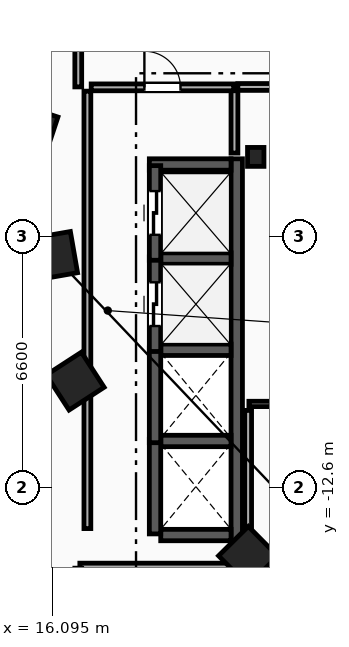
"""IFC4 building model, lengths in metres.
Left out: names, types, materials, properties, quantities, classifications, styles, units other than length and angle.
Written with IfcOpenShell. Run it as: python <this file> out.ifc"""

import sys

from ifc_helpers import new_model, si_unit, direction, frame, frame_2d, origin, origin_2d, place, context, subcontext, project, spatial, rectangle, i_section, extrude, element, fill, save


model = new_model("IFC4")
c1 = context("Model", 3, precision=1e-05, world=origin(), true_north=direction((0.0, 1.0)))
c2 = subcontext(c1, "Body", "Model", "MODEL_VIEW")
j1 = project(units=[si_unit("LENGTHUNIT", "METRE"), si_unit("PLANEANGLEUNIT", "RADIAN")], contexts=[c1])
p1 = place(None, origin())
s1 = spatial("IfcSite", under=j1, at=p1, CompositionType="ELEMENT")
p2 = place(p1, origin())
s2 = spatial("IfcBuilding", under=s1, at=p2, CompositionType="ELEMENT")
p3 = place(p2, frame((0.0, 0.0, 99.8)))
s3 = spatial("IfcBuildingStorey", under=s2, at=p3, CompositionType="ELEMENT", Elevation=99.8)
p4 = place(p3, frame((21.45, -3.9, 0.0), z_axis=(0.0, 0.0, 1.0), x_axis=(1.0, 0.0, 0.0)))
e1 = element("IfcColumn", 1, at=p4, inside=s3, PredefinedType="COLUMN", context=c2, shape_type="SweptSolid", body=[
    extrude(i_section(OverallWidth=0.432, OverallDepth=0.498, WebThickness=0.056, FlangeThickness=0.089, FilletRadius=0.018, at=origin_2d()), origin(), (0.0, 0.0, 1.0), 3.6),
])
for number, where, z_axis, x_axis in (
    (2, (15.55, -3.2, 0.0), (0.0, 0.0, 1.0), (-0.315, -0.949, 0.0)),
    (3, (16.125, -6.5, 0.0), (0.0, 0.0, 1.0), (0.172, -0.985, 0.0)),
    (4, (16.7, -9.8, 0.0), (0.0, 0.0, 1.0), (0.544, -0.839, 0.0)),
    (5, (21.25, -14.4, 0.0), (0.0, 0.0, 1.0), (0.703, -0.711, 0.0)),
):
    element("IfcColumn", number, at=place(p3, frame(where, z_axis=z_axis, x_axis=x_axis)), inside=s3, PredefinedType="COLUMN", context=c2, shape_type="SweptSolid", body=[
        extrude(rectangle(XDim=1.1, YDim=1.1, at=origin_2d()), origin(), (0.0, 0.0, 1.0), 3.6),
    ])
p5 = place(p3, frame((20.89, -3.8, 0.0), z_axis=(0.0, 0.0, 1.0), x_axis=(0.0, 1.0, 0.0)))
e6 = element("IfcWall", 6, at=p5, inside=s3, PredefinedType="PARTITIONING", context=c2, shape_type="SweptSolid", body=[
    extrude(rectangle(XDim=1.65, YDim=0.18, at=frame_2d((0.825, 0.0))), origin(), (0.0, 0.0, 1.0), 3.3),
])
p6 = place(p3, frame((20.98, -2.06, 0.0), z_axis=(0.0, 0.0, 1.0), x_axis=(1.0, 0.0, 0.0)))
e7 = element("IfcWall", 7, at=p6, inside=s3, PredefinedType="PARTITIONING", context=c2, shape_type="SweptSolid", body=[
    extrude(rectangle(XDim=3.0, YDim=0.18, at=frame_2d((1.5, 0.0))), origin(), (0.0, 0.0, 1.0), 3.3),
])
p7 = place(p6, frame((0.9, 0.0, 0.0)))
e8 = element("IfcOpeningElement", 8, at=p7, cuts=e7, PredefinedType="OPENING", context=c2, shape_type="SweptSolid", body=[
    extrude(rectangle(XDim=1.2, YDim=2.15, at=frame_2d((0.6, 1.075))), frame((0.0, 0.1, 0.0), z_axis=(0.0, -1.0, 0.0), x_axis=(1.0, 0.0, 0.0)), (0.0, 0.0, 1.0), 0.2),
])
p8 = place(p3, frame((20.95, -14.0, 0.0), z_axis=(0.0, 0.0, 1.0), x_axis=(0.0, 1.0, 0.0)))
e9 = element("IfcWall", 9, at=p8, inside=s3, PredefinedType="SHEAR", context=c2, shape_type="SweptSolid", body=[
    extrude(rectangle(XDim=10.05, YDim=0.3, at=frame_2d((5.025, 0.0))), origin(), (0.0, 0.0, 1.0), 3.3),
])
p9 = place(p3, frame((18.95, -13.85, 0.0), z_axis=(0.0, 0.0, 1.0), x_axis=(1.0, 0.0, 0.0)))
e10 = element("IfcWall", 10, at=p9, inside=s3, PredefinedType="SHEAR", context=c2, shape_type="SweptSolid", body=[
    extrude(rectangle(XDim=1.85, YDim=0.3, at=frame_2d((0.925, 0.0))), origin(), (0.0, 0.0, 1.0), 3.3),
])
p10 = place(p3, frame((18.65, -4.1, 0.0), z_axis=(0.0, 0.0, 1.0), x_axis=(1.0, 0.0, 0.0)))
e11 = element("IfcWall", 11, at=p10, inside=s3, PredefinedType="SHEAR", context=c2, shape_type="SweptSolid", body=[
    extrude(rectangle(XDim=2.15, YDim=0.3, at=frame_2d((1.075, 0.0))), origin(), (0.0, 0.0, 1.0), 3.3),
])
for number, where, z_axis, x_axis in (
    (12, (18.95, -11.375, 0.0), (0.0, 0.0, 1.0), (1.0, 0.0, 0.0)),
    (13, (18.95, -8.975, 0.0), (0.0, 0.0, 1.0), (1.0, 0.0, 0.0)),
    (14, (18.95, -6.575, 0.0), (0.0, 0.0, 1.0), (1.0, 0.0, 0.0)),
):
    element("IfcWall", number, at=place(p3, frame(where, z_axis=z_axis, x_axis=x_axis)), inside=s3, PredefinedType="SHEAR", context=c2, shape_type="SweptSolid", body=[
        extrude(rectangle(XDim=1.85, YDim=0.3, at=frame_2d((0.925, 0.0))), origin(), (0.0, 0.0, 1.0), 3.3),
    ])
for number, where, z_axis, x_axis in (
    (15, (18.8, -13.82, 0.0), (0.0, 0.0, 1.0), (0.0, 1.0, 0.0)),
    (16, (18.8, -11.42, 0.0), (0.0, 0.0, 1.0), (0.0, 1.0, 0.0)),
):
    element("IfcWall", number, at=place(p3, frame(where, z_axis=z_axis, x_axis=x_axis)), inside=s3, PredefinedType="SHEAR", context=c2, shape_type="SweptSolid", body=[
        extrude(rectangle(XDim=2.49, YDim=0.3, at=frame_2d((1.245, 0.0))), origin(), (0.0, 0.0, 1.0), 3.3),
    ])
p11 = place(p3, frame((18.8, -9.02, 0.0), z_axis=(0.0, 0.0, 1.0), x_axis=(0.0, 1.0, 0.0)))
e17 = element("IfcWall", 17, at=p11, inside=s3, PredefinedType="SHEAR", context=c2, shape_type="SweptSolid", body=[
    extrude(rectangle(XDim=2.49, YDim=0.3, at=frame_2d((1.245, 0.0))), origin(), (0.0, 0.0, 1.0), 3.3),
])
p12 = place(p11, frame((0.67, 0.0, 0.0)))
e18 = element("IfcOpeningElement", 18, at=p12, cuts=e17, PredefinedType="OPENING", context=c2, shape_type="SweptSolid", body=[
    extrude(rectangle(XDim=1.15, YDim=2.2, at=frame_2d((0.575, 1.1))), frame((0.0, 0.16, 0.0), z_axis=(0.0, -1.0, 0.0), x_axis=(1.0, 0.0, 0.0)), (0.0, 0.0, 1.0), 0.32),
])
p13 = place(p3, frame((18.8, -6.62, 0.0), z_axis=(0.0, 0.0, 1.0), x_axis=(0.0, 1.0, 0.0)))
e19 = element("IfcWall", 19, at=p13, inside=s3, PredefinedType="SHEAR", context=c2, shape_type="SweptSolid", body=[
    extrude(rectangle(XDim=2.49, YDim=0.3, at=frame_2d((1.245, 0.0))), origin(), (0.0, 0.0, 1.0), 3.3),
])
p14 = place(p13, frame((0.67, 0.0, 0.0)))
e20 = element("IfcOpeningElement", 20, at=p14, cuts=e19, PredefinedType="OPENING", context=c2, shape_type="SweptSolid", body=[
    extrude(rectangle(XDim=1.15, YDim=2.2, at=frame_2d((0.575, 1.1))), frame((0.0, 0.16, 0.0), z_axis=(0.0, -1.0, 0.0), x_axis=(1.0, 0.0, 0.0)), (0.0, 0.0, 1.0), 0.32),
])
p15 = place(p3, frame((17.02, -13.68, 0.0), z_axis=(0.0, 0.0, 1.0), x_axis=(0.0, 1.0, 0.0)))
e21 = element("IfcWall", 21, at=p15, inside=s3, PredefinedType="PARTITIONING", context=c2, shape_type="SweptSolid", body=[
    extrude(rectangle(XDim=11.51, YDim=0.18, at=frame_2d((5.755, 0.0))), origin(), (0.0, 0.0, 1.0), 3.3),
])
p16 = place(p3, frame((17.12, -2.07, 0.0), z_axis=(0.0, 0.0, 1.0), x_axis=(1.0, 0.0, 0.0)))
e22 = element("IfcWall", 22, at=p16, inside=s3, PredefinedType="PARTITIONING", context=c2, shape_type="SweptSolid", body=[
    extrude(rectangle(XDim=3.75, YDim=0.18, at=frame_2d((1.875, 0.0))), origin(), (0.0, 0.0, 1.0), 3.3),
])
p17 = place(p16, frame((1.4, 0.0, 0.0)))
e23 = element("IfcOpeningElement", 23, at=p17, cuts=e22, PredefinedType="OPENING", context=c2, shape_type="SweptSolid", body=[
    extrude(rectangle(XDim=0.95, YDim=2.1, at=frame_2d((0.475, 1.05))), frame((0.0, 0.1, 0.0), z_axis=(0.0, -1.0, 0.0), x_axis=(1.0, 0.0, 0.0)), (0.0, 0.0, 1.0), 0.2),
])
p18 = place(p3, frame((21.27, -10.4, 0.0), z_axis=(0.0, 0.0, 1.0), x_axis=(1.0, 0.0, 0.0)))
e24 = element("IfcWall", 24, at=p18, inside=s3, PredefinedType="PARTITIONING", context=c2, shape_type="SweptSolid", body=[
    extrude(rectangle(XDim=0.59, YDim=0.14, at=frame_2d((0.295, 0.0))), origin(), (0.0, 0.0, 1.0), 3.3),
])
p19 = place(p3, frame((21.25, -14.93, 0.0), z_axis=(0.0, 0.0, 1.0), x_axis=(0.0, 1.0, 0.0)))
e25 = element("IfcWall", 25, at=p19, inside=s3, PredefinedType="PARTITIONING", context=c2, shape_type="SweptSolid", body=[
    extrude(rectangle(XDim=4.36, YDim=0.18, at=frame_2d((2.18, 0.0))), origin(), (0.0, 0.0, 1.0), 3.3),
])
p20 = place(p3, frame((21.178, -14.68, 0.0), z_axis=(0.0, 0.0, 1.0), x_axis=(-1.0, 0.0, 0.0)))
e26 = element("IfcWall", 26, at=p20, inside=s3, PredefinedType="PARTITIONING", context=c2, shape_type="SweptSolid", body=[
    extrude(rectangle(XDim=4.357, YDim=0.18, at=frame_2d((2.178, 0.0))), origin(), (0.0, 0.0, 1.0), 3.3),
])
p21 = place(p3, frame((16.78, 0.329, 0.0), z_axis=(0.0, 0.0, 1.0), x_axis=(0.0, -1.0, 0.0)))
e27 = element("IfcWall", 27, at=p21, inside=s3, PredefinedType="PARTITIONING", context=c2, shape_type="SweptSolid", body=[
    extrude(rectangle(XDim=2.387, YDim=0.18, at=frame_2d((1.194, 0.0))), origin(), (0.0, 0.0, 1.0), 3.3),
])
p22 = place(p12, origin())
e28 = element("IfcDoor", 28, at=p22, inside=s3, OperationType="SLIDING_TO_LEFT", PredefinedType="TRAPDOOR", context=c2, shape_type="SweptSolid", body=[
    extrude(rectangle(XDim=1.15, YDim=2.2, at=frame_2d((0.575, 1.1))), frame((0.0, 0.025, 0.0), z_axis=(0.0, -1.0, 0.0), x_axis=(1.0, 0.0, 0.0)), (0.0, 0.0, 1.0), 0.05),
])
fill(e18, e28)
p23 = place(p14, origin())
e29 = element("IfcDoor", 29, at=p23, inside=s3, OperationType="SLIDING_TO_LEFT", PredefinedType="TRAPDOOR", context=c2, shape_type="SweptSolid", body=[
    extrude(rectangle(XDim=1.15, YDim=2.2, at=frame_2d((0.575, 1.1))), frame((0.0, 0.025, 0.0), z_axis=(0.0, -1.0, 0.0), x_axis=(1.0, 0.0, 0.0)), (0.0, 0.0, 1.0), 0.05),
])
fill(e20, e29)
p24 = place(p17, origin())
e30 = element("IfcDoor", 30, at=p24, inside=s3, OperationType="SINGLE_SWING_LEFT", PredefinedType="DOOR", context=c2, shape_type="SweptSolid", body=[
    extrude(rectangle(XDim=0.95, YDim=2.1, at=frame_2d((0.475, 1.05))), frame((0.0, 0.025, 0.0), z_axis=(0.0, -1.0, 0.0), x_axis=(1.0, 0.0, 0.0)), (0.0, 0.0, 1.0), 0.05),
])
fill(e23, e30)
save(model, sys.argv[1])
